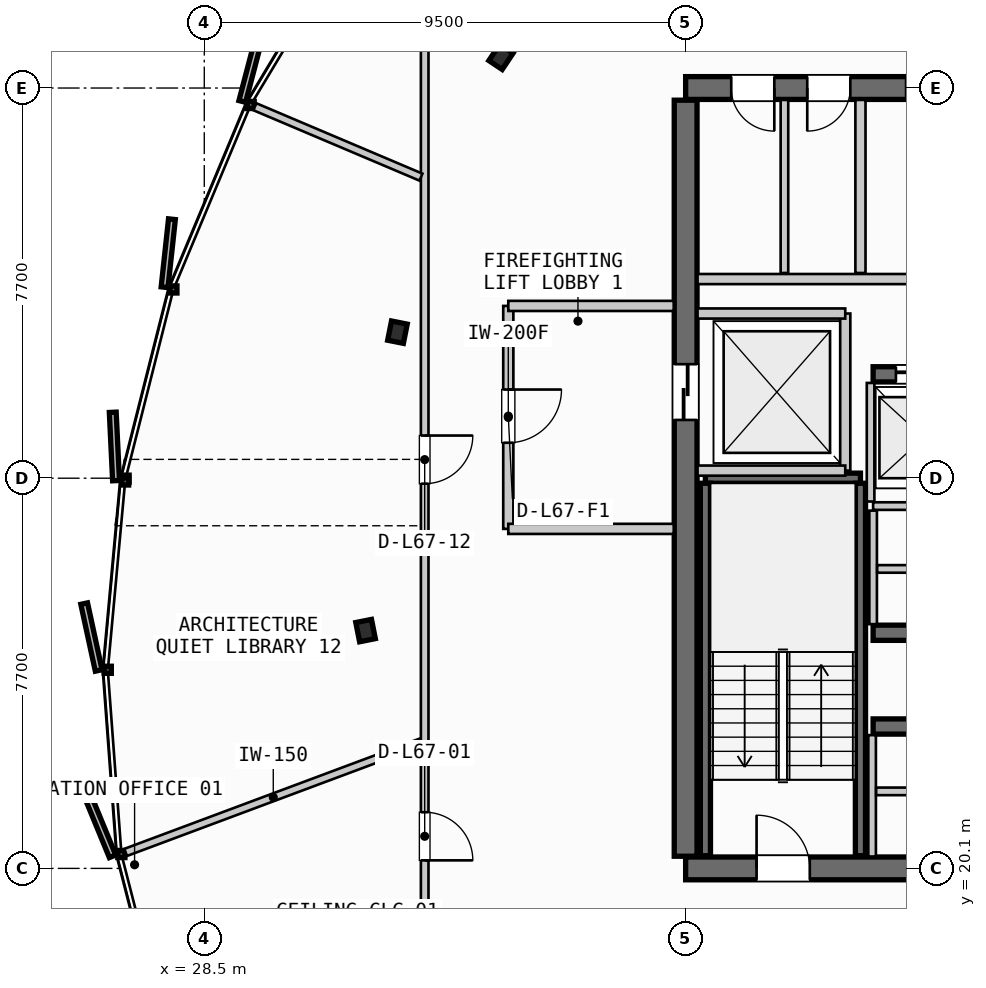
"""IFC4 building model, lengths in metres.
Left out: names, types, materials, properties, quantities, classifications, styles, units other than length and angle.
Written with IfcOpenShell. Run it as: python <this file> out.ifc"""

import sys

from ifc_helpers import new_model, si_unit, direction, frame, frame_2d, origin, origin_2d, place, context, subcontext, project, spatial, rectangle, i_section, extrude, source, transform, mapped, element, fill, save


model = new_model("IFC4")
c1 = context("Model", 3, precision=1e-05, world=origin(), true_north=direction((0.0, 1.0)))
c2 = subcontext(c1, "Body", "Model", "MODEL_VIEW")
j1 = project(units=[si_unit("LENGTHUNIT", "METRE"), si_unit("PLANEANGLEUNIT", "RADIAN")], contexts=[c1])
p1 = place(None, origin())
s1 = spatial("IfcSite", under=j1, at=p1, CompositionType="ELEMENT")
p2 = place(p1, origin())
s2 = spatial("IfcBuilding", under=s1, at=p2, CompositionType="ELEMENT")
p3 = place(p2, frame((0.0, 0.0, 256.0)))
s3 = spatial("IfcBuildingStorey", under=s2, at=p3, CompositionType="ELEMENT", Elevation=256.0)
p4 = place(p3, frame((38.0, 20.1, 0.0), z_axis=(0.0, 0.0, 1.0), x_axis=(1.0, 0.0, 0.0)))
e1 = element("IfcWall", 1, at=p4, inside=s3, PredefinedType="SHEAR", context=c2, shape_type="SweptSolid", body=[
    extrude(rectangle(XDim=17.6, YDim=0.45, at=frame_2d((8.8, 0.0))), origin(), (0.0, 0.0, 1.0), 3.21),
])
p5 = place(p4, frame((1.4, 0.0, 0.0)))
e2 = element("IfcOpeningElement", 2, at=p5, cuts=e1, PredefinedType="OPENING", context=c2, shape_type="SweptSolid", body=[
    extrude(rectangle(XDim=1.05, YDim=2.15, at=frame_2d((0.525, 1.075))), frame((0.0, 0.235, 0.0), z_axis=(0.0, -1.0, 0.0), x_axis=(1.0, 0.0, 0.0)), (0.0, 0.0, 1.0), 0.47),
])
p6 = place(p4, frame((15.15, 0.0, 0.0)))
e3 = element("IfcOpeningElement", 3, at=p6, cuts=e1, PredefinedType="OPENING", context=c2, shape_type="SweptSolid", body=[
    extrude(rectangle(XDim=1.05, YDim=2.15, at=frame_2d((0.525, 1.075))), frame((0.0, 0.235, 0.0), z_axis=(0.0, -1.0, 0.0), x_axis=(1.0, 0.0, 0.0)), (0.0, 0.0, 1.0), 0.47),
])
p7 = place(p4, frame((5.25, 0.0, 0.0)))
e4 = element("IfcOpeningElement", 4, at=p7, cuts=e1, PredefinedType="OPENING", context=c2, shape_type="SweptSolid", body=[
    extrude(rectangle(XDim=0.95, YDim=2.15, at=frame_2d((0.475, 1.075))), frame((0.0, 0.235, 0.0), z_axis=(0.0, -1.0, 0.0), x_axis=(1.0, 0.0, 0.0)), (0.0, 0.0, 1.0), 0.47),
])
p8 = place(p4, frame((11.4, 0.0, 0.0)))
e5 = element("IfcOpeningElement", 5, at=p8, cuts=e1, PredefinedType="OPENING", context=c2, shape_type="SweptSolid", body=[
    extrude(rectangle(XDim=0.95, YDim=2.15, at=frame_2d((0.475, 1.075))), frame((0.0, 0.235, 0.0), z_axis=(0.0, -1.0, 0.0), x_axis=(1.0, 0.0, 0.0)), (0.0, 0.0, 1.0), 0.47),
])
p9 = place(p3, frame((55.6, 35.5, 0.0), z_axis=(0.0, 0.0, 1.0), x_axis=(-1.0, 0.0, 0.0)))
e6 = element("IfcWall", 6, at=p9, inside=s3, PredefinedType="SHEAR", context=c2, shape_type="SweptSolid", body=[
    extrude(rectangle(XDim=17.6, YDim=0.45, at=frame_2d((8.8, 0.0))), origin(), (0.0, 0.0, 1.0), 3.21),
])
p10 = place(p9, frame((8.05, 0.0, 0.0)))
e7 = element("IfcOpeningElement", 7, at=p10, cuts=e6, PredefinedType="OPENING", context=c2, shape_type="SweptSolid", body=[
    extrude(rectangle(XDim=1.5, YDim=2.2, at=frame_2d((0.75, 1.1))), frame((0.0, 0.235, 0.0), z_axis=(0.0, -1.0, 0.0), x_axis=(1.0, 0.0, 0.0)), (0.0, 0.0, 1.0), 0.47),
])
p11 = place(p9, frame((15.85, 0.0, 0.0)))
e8 = element("IfcOpeningElement", 8, at=p11, cuts=e6, PredefinedType="OPENING", context=c2, shape_type="SweptSolid", body=[
    extrude(rectangle(XDim=0.85, YDim=2.15, at=frame_2d((0.425, 1.075))), frame((0.0, 0.235, 0.0), z_axis=(0.0, -1.0, 0.0), x_axis=(1.0, 0.0, 0.0)), (0.0, 0.0, 1.0), 0.47),
])
p12 = place(p9, frame((14.35, 0.0, 0.0)))
e9 = element("IfcOpeningElement", 9, at=p12, cuts=e6, PredefinedType="OPENING", context=c2, shape_type="SweptSolid", body=[
    extrude(rectangle(XDim=0.85, YDim=2.15, at=frame_2d((0.425, 1.075))), frame((0.0, 0.235, 0.0), z_axis=(0.0, -1.0, 0.0), x_axis=(1.0, 0.0, 0.0)), (0.0, 0.0, 1.0), 0.47),
])
p13 = place(p9, frame((12.3, 0.0, 0.0)))
e10 = element("IfcOpeningElement", 10, at=p13, cuts=e6, PredefinedType="OPENING", context=c2, shape_type="SweptSolid", body=[
    extrude(rectangle(XDim=0.95, YDim=2.15, at=frame_2d((0.475, 1.075))), frame((0.0, 0.235, 0.0), z_axis=(0.0, -1.0, 0.0), x_axis=(1.0, 0.0, 0.0)), (0.0, 0.0, 1.0), 0.47),
])
p14 = place(p9, frame((10.2, 0.0, 0.0)))
e11 = element("IfcOpeningElement", 11, at=p14, cuts=e6, PredefinedType="OPENING", context=c2, shape_type="SweptSolid", body=[
    extrude(rectangle(XDim=0.9, YDim=2.15, at=frame_2d((0.45, 1.075))), frame((0.0, 0.235, 0.0), z_axis=(0.0, -1.0, 0.0), x_axis=(1.0, 0.0, 0.0)), (0.0, 0.0, 1.0), 0.47),
])
p15 = place(p3, frame((38.0, 35.26, 0.0), z_axis=(0.0, 0.0, 1.0), x_axis=(0.0, -1.0, 0.0)))
e12 = element("IfcWall", 12, at=p15, inside=s3, PredefinedType="SHEAR", context=c2, shape_type="SweptSolid", body=[
    extrude(rectangle(XDim=14.92, YDim=0.45, at=frame_2d((7.46, 0.0))), origin(), (0.0, 0.0, 1.0), 3.21),
])
p16 = place(p15, frame((5.21, 0.0, 0.0)))
e13 = element("IfcOpeningElement", 13, at=p16, cuts=e12, PredefinedType="OPENING", context=c2, shape_type="SweptSolid", body=[
    extrude(rectangle(XDim=1.1, YDim=2.2, at=frame_2d((0.55, 1.1))), frame((0.0, 0.235, 0.0), z_axis=(0.0, -1.0, 0.0), x_axis=(1.0, 0.0, 0.0)), (0.0, 0.0, 1.0), 0.47),
])
p17 = place(p3, frame((41.7, 22.9, 0.0), z_axis=(0.0, 0.0, 1.0), x_axis=(1.0, 0.0, 0.0)))
e14 = element("IfcWall", 14, at=p17, inside=s3, PredefinedType="SHEAR", context=c2, shape_type="SweptSolid", body=[
    extrude(rectangle(XDim=4.25, YDim=0.3, at=frame_2d((2.125, 0.0))), origin(), (0.0, 0.0, 1.0), 3.21),
])
p18 = place(p3, frame((41.7, 24.75, 0.0), z_axis=(0.0, 0.0, 1.0), x_axis=(1.0, 0.0, 0.0)))
e15 = element("IfcWall", 15, at=p18, inside=s3, PredefinedType="SHEAR", context=c2, shape_type="SweptSolid", body=[
    extrude(rectangle(XDim=4.25, YDim=0.3, at=frame_2d((2.125, 0.0))), origin(), (0.0, 0.0, 1.0), 3.21),
])
p19 = place(p18, frame((1.55, 0.0, 0.0)))
e16 = element("IfcOpeningElement", 16, at=p19, cuts=e15, PredefinedType="OPENING", context=c2, shape_type="SweptSolid", body=[
    extrude(rectangle(XDim=0.95, YDim=2.15, at=frame_2d((0.475, 1.075))), frame((0.0, 0.16, 0.0), z_axis=(0.0, -1.0, 0.0), x_axis=(1.0, 0.0, 0.0)), (0.0, 0.0, 1.0), 0.32),
])
p20 = place(p3, frame((41.7, 29.85, 0.0), z_axis=(0.0, 0.0, 1.0), x_axis=(1.0, 0.0, 0.0)))
e17 = element("IfcWall", 17, at=p20, inside=s3, PredefinedType="SHEAR", context=c2, shape_type="SweptSolid", body=[
    extrude(rectangle(XDim=4.25, YDim=0.3, at=frame_2d((2.125, 0.0))), origin(), (0.0, 0.0, 1.0), 3.21),
])
p21 = place(p20, frame((0.45, 0.0, 0.0)))
e18 = element("IfcOpeningElement", 18, at=p21, cuts=e17, PredefinedType="OPENING", context=c2, shape_type="SweptSolid", body=[
    extrude(rectangle(XDim=1.1, YDim=2.2, at=frame_2d((0.55, 1.1))), frame((0.0, 0.16, 0.0), z_axis=(0.0, -1.0, 0.0), x_axis=(1.0, 0.0, 0.0)), (0.0, 0.0, 1.0), 0.32),
])
p22 = place(p20, frame((2.5, 0.0, 0.0)))
e19 = element("IfcOpeningElement", 19, at=p22, cuts=e17, PredefinedType="OPENING", context=c2, shape_type="SweptSolid", body=[
    extrude(rectangle(XDim=1.1, YDim=2.2, at=frame_2d((0.55, 1.1))), frame((0.0, 0.16, 0.0), z_axis=(0.0, -1.0, 0.0), x_axis=(1.0, 0.0, 0.0)), (0.0, 0.0, 1.0), 0.32),
])
m1 = source(origin(), c2, "Body", "SweptSolid", [
    extrude(i_section(OverallWidth=0.387, OverallDepth=0.316, WebThickness=0.019, FlangeThickness=0.028, FilletRadius=0.015, at=origin_2d()), origin(), (0.0, 0.0, 1.0), 3.21),
])
for number, where, z_axis, x_axis in (
    (20, (34.356, 36.115, 0.0), (0.0, 0.0, 1.0), (-0.831, 0.556, 0.0)),
    (21, (32.312, 30.682, 0.0), (0.0, 0.0, 1.0), (-0.981, 0.195, 0.0)),
    (22, (31.683, 24.793, 0.0), (0.0, 0.0, 1.0), (-0.981, -0.195, 0.0)),
):
    element("IfcColumn", number, at=place(p3, frame(where, z_axis=z_axis, x_axis=x_axis)), inside=s3, PredefinedType="COLUMN", context=c2, shape_type="MappedRepresentation", body=[
        mapped(m1, transform((0.0, 0.0, 0.0), scale=1.0)),
    ])
p23 = place(p3, frame((38.39, 27.8, 0.0), z_axis=(0.0, 0.0, 1.0), x_axis=(1.0, 0.0, 0.0)))
e23 = element("IfcWall", 23, at=p23, inside=s3, PredefinedType="SHEAR", context=c2, shape_type="SweptSolid", body=[
    extrude(rectangle(XDim=3.06, YDim=0.2, at=frame_2d((1.53, 0.0))), origin(), (0.0, 0.0, 1.0), 3.21),
])
for number, where, z_axis, x_axis in (
    (24, (41.45, 27.7, 0.0), (0.0, 0.0, 1.0), (0.0, -1.0, 0.0)),
    (25, (38.39, 20.35, 0.0), (0.0, 0.0, 1.0), (0.0, 1.0, 0.0)),
):
    element("IfcWall", number, at=place(p3, frame(where, z_axis=z_axis, x_axis=x_axis)), inside=s3, PredefinedType="SHEAR", context=c2, shape_type="SweptSolid", body=[
        extrude(rectangle(XDim=7.35, YDim=0.2, at=frame_2d((3.675, 0.0))), origin(), (0.0, 0.0, 1.0), 3.21),
    ])
p24 = place(p3, frame((41.15, 27.95, 0.0), z_axis=(0.0, 0.0, 1.0), x_axis=(0.0, 1.0, 0.0)))
e26 = element("IfcWall", 26, at=p24, inside=s3, PredefinedType="PARTITIONING", context=c2, shape_type="SweptSolid", body=[
    extrude(rectangle(XDim=3.1, YDim=0.2, at=frame_2d((1.55, 0.0))), origin(), (0.0, 0.0, 1.0), 2.28),
])
for number, where, z_axis, x_axis in (
    (27, (38.235, 27.95, 0.0), (0.0, 0.0, 1.0), (1.0, 0.0, 0.0)),
    (28, (38.235, 31.05, 0.0), (0.0, 0.0, 1.0), (1.0, 0.0, 0.0)),
):
    element("IfcWall", number, at=place(p3, frame(where, z_axis=z_axis, x_axis=x_axis)), inside=s3, PredefinedType="PARTITIONING", context=c2, shape_type="SweptSolid", body=[
        extrude(rectangle(XDim=2.915, YDim=0.2, at=frame_2d((1.458, 0.0))), origin(), (0.0, 0.0, 1.0), 2.28),
    ])
p25 = place(p3, frame((34.5, 31.2, 0.0), z_axis=(0.0, 0.0, 1.0), x_axis=(0.0, -1.0, 0.0)))
e29 = element("IfcWall", 29, at=p25, inside=s3, PredefinedType="PARTITIONING", context=c2, shape_type="SweptSolid", body=[
    extrude(rectangle(XDim=4.4, YDim=0.2, at=frame_2d((2.2, 0.0))), origin(), (0.0, 0.0, 1.0), 2.28),
])
p26 = place(p25, frame((1.65, 0.0, 0.0)))
e30 = element("IfcOpeningElement", 30, at=p26, cuts=e29, PredefinedType="OPENING", context=c2, shape_type="SweptSolid", body=[
    extrude(rectangle(XDim=1.05, YDim=2.15, at=frame_2d((0.525, 1.075))), frame((0.0, 0.11, 0.0), z_axis=(0.0, -1.0, 0.0), x_axis=(1.0, 0.0, 0.0)), (0.0, 0.0, 1.0), 0.22),
])
for number, where, z_axis, x_axis in (
    (31, (34.5, 26.8, 0.0), (0.0, 0.0, 1.0), (1.0, 0.0, 0.0)),
    (32, (34.5, 31.2, 0.0), (0.0, 0.0, 1.0), (1.0, 0.0, 0.0)),
):
    element("IfcWall", number, at=place(p3, frame(where, z_axis=z_axis, x_axis=x_axis)), inside=s3, PredefinedType="PARTITIONING", context=c2, shape_type="SweptSolid", body=[
        extrude(rectangle(XDim=3.265, YDim=0.2, at=frame_2d((1.632, 0.0))), origin(), (0.0, 0.0, 1.0), 2.28),
    ])
p27 = place(p3, frame((41.68, 20.335, 0.0), z_axis=(0.0, 0.0, 1.0), x_axis=(0.0, 1.0, 0.0)))
e33 = element("IfcWall", 33, at=p27, inside=s3, PredefinedType="PARTITIONING", context=c2, shape_type="SweptSolid", body=[
    extrude(rectangle(XDim=2.395, YDim=0.15, at=frame_2d((1.198, 0.0))), origin(), (0.0, 0.0, 1.0), 2.28),
])
p28 = place(p3, frame((41.76, 21.62, 0.0), z_axis=(0.0, 0.0, 1.0), x_axis=(1.0, 0.0, 0.0)))
e34 = element("IfcWall", 34, at=p28, inside=s3, PredefinedType="PARTITIONING", context=c2, shape_type="SweptSolid", body=[
    extrude(rectangle(XDim=3.96, YDim=0.15, at=frame_2d((1.98, 0.0))), origin(), (0.0, 0.0, 1.0), 2.28),
])
p29 = place(p28, frame((1.55, 0.0, 0.0)))
e35 = element("IfcOpeningElement", 35, at=p29, cuts=e34, PredefinedType="OPENING", context=c2, shape_type="SweptSolid", body=[
    extrude(rectangle(XDim=0.85, YDim=2.15, at=frame_2d((0.425, 1.075))), frame((0.0, 0.085, 0.0), z_axis=(0.0, -1.0, 0.0), x_axis=(1.0, 0.0, 0.0)), (0.0, 0.0, 1.0), 0.17),
])
p30 = place(p3, frame((41.7, 27.25, 0.0), z_axis=(0.0, 0.0, 1.0), x_axis=(1.0, 0.0, 0.0)))
e36 = element("IfcWall", 36, at=p30, inside=s3, PredefinedType="PARTITIONING", context=c2, shape_type="SweptSolid", body=[
    extrude(rectangle(XDim=4.25, YDim=0.15, at=frame_2d((2.125, 0.0))), origin(), (0.0, 0.0, 1.0), 2.28),
])
p31 = place(p3, frame((41.7, 24.92, 0.0), z_axis=(0.0, 0.0, 1.0), x_axis=(0.0, 1.0, 0.0)))
e37 = element("IfcWall", 37, at=p31, inside=s3, PredefinedType="PARTITIONING", context=c2, shape_type="SweptSolid", body=[
    extrude(rectangle(XDim=2.24, YDim=0.15, at=frame_2d((1.12, 0.0))), origin(), (0.0, 0.0, 1.0), 2.28),
])
p32 = place(p3, frame((41.78, 26.01, 0.0), z_axis=(0.0, 0.0, 1.0), x_axis=(1.0, 0.0, 0.0)))
e38 = element("IfcWall", 38, at=p32, inside=s3, PredefinedType="PARTITIONING", context=c2, shape_type="SweptSolid", body=[
    extrude(rectangle(XDim=4.09, YDim=0.15, at=frame_2d((2.045, 0.0))), origin(), (0.0, 0.0, 1.0), 2.28),
])
p33 = place(p32, frame((1.6, 0.0, 0.0)))
e39 = element("IfcOpeningElement", 39, at=p33, cuts=e38, PredefinedType="OPENING", context=c2, shape_type="SweptSolid", body=[
    extrude(rectangle(XDim=0.85, YDim=2.15, at=frame_2d((0.425, 1.075))), frame((0.0, 0.085, 0.0), z_axis=(0.0, -1.0, 0.0), x_axis=(1.0, 0.0, 0.0)), (0.0, 0.0, 1.0), 0.17),
])
p34 = place(p3, frame((41.65, 27.34, 0.0), z_axis=(0.0, 0.0, 1.0), x_axis=(0.0, 1.0, 0.0)))
e40 = element("IfcWall", 40, at=p34, inside=s3, PredefinedType="PARTITIONING", context=c2, shape_type="SweptSolid", body=[
    extrude(rectangle(XDim=2.34, YDim=0.15, at=frame_2d((1.17, 0.0))), origin(), (0.0, 0.0, 1.0), 2.28),
])
p35 = place(p3, frame((41.45, 31.85, 0.0), z_axis=(0.0, 0.0, 1.0), x_axis=(0.0, 1.0, 0.0)))
e41 = element("IfcWall", 41, at=p35, inside=s3, PredefinedType="PARTITIONING", context=c2, shape_type="SweptSolid", body=[
    extrude(rectangle(XDim=3.415, YDim=0.2, at=frame_2d((1.708, 0.0))), origin(), (0.0, 0.0, 1.0), 2.28),
])
p36 = place(p3, frame((38.235, 31.73, 0.0), z_axis=(0.0, 0.0, 1.0), x_axis=(1.0, 0.0, 0.0)))
e42 = element("IfcWall", 42, at=p36, inside=s3, PredefinedType="PARTITIONING", context=c2, shape_type="SweptSolid", body=[
    extrude(rectangle(XDim=7.565, YDim=0.2, at=frame_2d((3.782, 0.0))), origin(), (0.0, 0.0, 1.0), 2.28),
])
p37 = place(p3, frame((39.95, 31.85, 0.0), z_axis=(0.0, 0.0, 1.0), x_axis=(0.0, 1.0, 0.0)))
e43 = element("IfcWall", 43, at=p37, inside=s3, PredefinedType="PARTITIONING", context=c2, shape_type="SweptSolid", body=[
    extrude(rectangle(XDim=3.415, YDim=0.15, at=frame_2d((1.708, 0.0))), origin(), (0.0, 0.0, 1.0), 2.28),
])
p38 = place(p3, frame((32.85, 37.562, 0.0), z_axis=(0.0, 0.0, 1.0), x_axis=(0.0, -1.0, 0.0)))
e44 = element("IfcWall", 44, at=p38, inside=s3, PredefinedType="PARTITIONING", context=c2, shape_type="SweptSolid", body=[
    extrude(rectangle(XDim=19.293, YDim=0.15, at=frame_2d((9.646, 0.0))), origin(), (0.0, 0.0, 1.0), 2.28),
])
p39 = place(p38, frame((16.354, 0.0, 0.0)))
e45 = element("IfcOpeningElement", 45, at=p39, cuts=e44, PredefinedType="OPENING", context=c2, shape_type="SweptSolid", body=[
    extrude(rectangle(XDim=0.95, YDim=2.15, at=frame_2d((0.475, 1.075))), frame((0.0, 0.085, 0.0), z_axis=(0.0, -1.0, 0.0), x_axis=(1.0, 0.0, 0.0)), (0.0, 0.0, 1.0), 0.17),
])
p40 = place(p38, frame((8.92, 0.0, 0.0)))
e46 = element("IfcOpeningElement", 46, at=p40, cuts=e44, PredefinedType="OPENING", context=c2, shape_type="SweptSolid", body=[
    extrude(rectangle(XDim=0.95, YDim=2.15, at=frame_2d((0.475, 1.075))), frame((0.0, 0.085, 0.0), z_axis=(0.0, -1.0, 0.0), x_axis=(1.0, 0.0, 0.0)), (0.0, 0.0, 1.0), 0.17),
])
p41 = place(p3, frame((32.775, 22.59, 0.0), z_axis=(0.0, 0.0, 1.0), x_axis=(-0.936863634519, -0.349694910337, 0.0)))
e47 = element("IfcWall", 47, at=p41, inside=s3, PredefinedType="PARTITIONING", context=c2, shape_type="SweptSolid", body=[
    extrude(rectangle(XDim=6.22, YDim=0.15, at=frame_2d((3.11, 0.0))), origin(), (0.0, 0.0, 1.0), 2.28),
])
p42 = place(p3, frame((32.776, 33.741, 0.0), z_axis=(0.0, 0.0, 1.0), x_axis=(-0.920716223147, 0.390232797743, 0.0)))
e48 = element("IfcWall", 48, at=p42, inside=s3, PredefinedType="PARTITIONING", context=c2, shape_type="SweptSolid", body=[
    extrude(rectangle(XDim=3.56, YDim=0.15, at=frame_2d((1.78, 0.0))), origin(), (0.0, 0.0, 1.0), 2.28),
])
m2 = source(origin(), c2, "Body", "SweptSolid", [
    extrude(rectangle(XDim=1.05, YDim=2.15, at=frame_2d((0.525, 1.075))), frame((0.0, 0.025, 0.0), z_axis=(0.0, -1.0, 0.0), x_axis=(1.0, 0.0, 0.0)), (0.0, 0.0, 1.0), 0.05),
])
p43 = place(p5, origin())
e49 = element("IfcDoor", 49, at=p43, inside=s3, OperationType="SINGLE_SWING_LEFT", PredefinedType="DOOR", context=c2, shape_type="MappedRepresentation", body=[
    mapped(m2, transform((0.0, 0.0, 0.0), scale=1.0)),
])
fill(e2, e49)
m3 = source(origin(), c2, "Body", "SweptSolid", [
    extrude(rectangle(XDim=1.1, YDim=2.2, at=frame_2d((0.55, 1.1))), frame((0.0, 0.025, 0.0), z_axis=(0.0, -1.0, 0.0), x_axis=(1.0, 0.0, 0.0)), (0.0, 0.0, 1.0), 0.05),
])
p44 = place(p16, origin())
e50 = element("IfcDoor", 50, at=p44, inside=s3, OperationType="SLIDING_TO_LEFT", PredefinedType="DOOR", context=c2, shape_type="MappedRepresentation", body=[
    mapped(m3, transform((0.0, 0.0, 0.0), scale=1.0)),
])
fill(e13, e50)
p45 = place(p21, origin())
e51 = element("IfcDoor", 51, at=p45, inside=s3, OperationType="SLIDING_TO_LEFT", PredefinedType="DOOR", context=c2, shape_type="MappedRepresentation", body=[
    mapped(m3, transform((0.0, 0.0, 0.0), scale=1.0)),
])
fill(e18, e51)
m4 = source(origin(), c2, "Body", "SweptSolid", [
    extrude(rectangle(XDim=0.85, YDim=2.15, at=frame_2d((0.425, 1.075))), frame((0.0, 0.025, 0.0), z_axis=(0.0, -1.0, 0.0), x_axis=(1.0, 0.0, 0.0)), (0.0, 0.0, 1.0), 0.05),
])
p46 = place(p11, origin())
e52 = element("IfcDoor", 52, at=p46, inside=s3, OperationType="SINGLE_SWING_LEFT", PredefinedType="DOOR", context=c2, shape_type="MappedRepresentation", body=[
    mapped(m4, transform((0.0, 0.0, 0.0), scale=1.0)),
])
fill(e8, e52)
p47 = place(p12, origin())
e53 = element("IfcDoor", 53, at=p47, inside=s3, OperationType="SINGLE_SWING_RIGHT", PredefinedType="DOOR", context=c2, shape_type="MappedRepresentation", body=[
    mapped(m4, transform((0.0, 0.0, 0.0), scale=1.0)),
])
fill(e9, e53)
m5 = source(origin(), c2, "Body", "SweptSolid", [
    extrude(rectangle(XDim=0.95, YDim=2.15, at=frame_2d((0.475, 1.075))), frame((0.0, 0.025, 0.0), z_axis=(0.0, -1.0, 0.0), x_axis=(1.0, 0.0, 0.0)), (0.0, 0.0, 1.0), 0.05),
])
p48 = place(p13, origin())
e54 = element("IfcDoor", 54, at=p48, inside=s3, OperationType="SINGLE_SWING_LEFT", PredefinedType="DOOR", context=c2, shape_type="MappedRepresentation", body=[
    mapped(m5, transform((0.0, 0.0, 0.0), scale=1.0)),
])
fill(e10, e54)
p49 = place(p26, origin())
e55 = element("IfcDoor", 55, at=p49, inside=s3, OperationType="SINGLE_SWING_LEFT", PredefinedType="DOOR", context=c2, shape_type="MappedRepresentation", body=[
    mapped(m2, transform((0.0, 0.0, 0.0), scale=1.0)),
])
fill(e30, e55)
p50 = place(p39, origin())
e56 = element("IfcDoor", 56, at=p50, inside=s3, OperationType="SINGLE_SWING_RIGHT", PredefinedType="DOOR", context=c2, shape_type="MappedRepresentation", body=[
    mapped(m5, transform((0.0, 0.0, 0.0), scale=1.0)),
])
fill(e45, e56)
p51 = place(p40, origin())
e57 = element("IfcDoor", 57, at=p51, inside=s3, OperationType="SINGLE_SWING_LEFT", PredefinedType="DOOR", context=c2, shape_type="MappedRepresentation", body=[
    mapped(m5, transform((0.0, 0.0, 0.0), scale=1.0)),
])
fill(e46, e57)
save(model, sys.argv[1])
